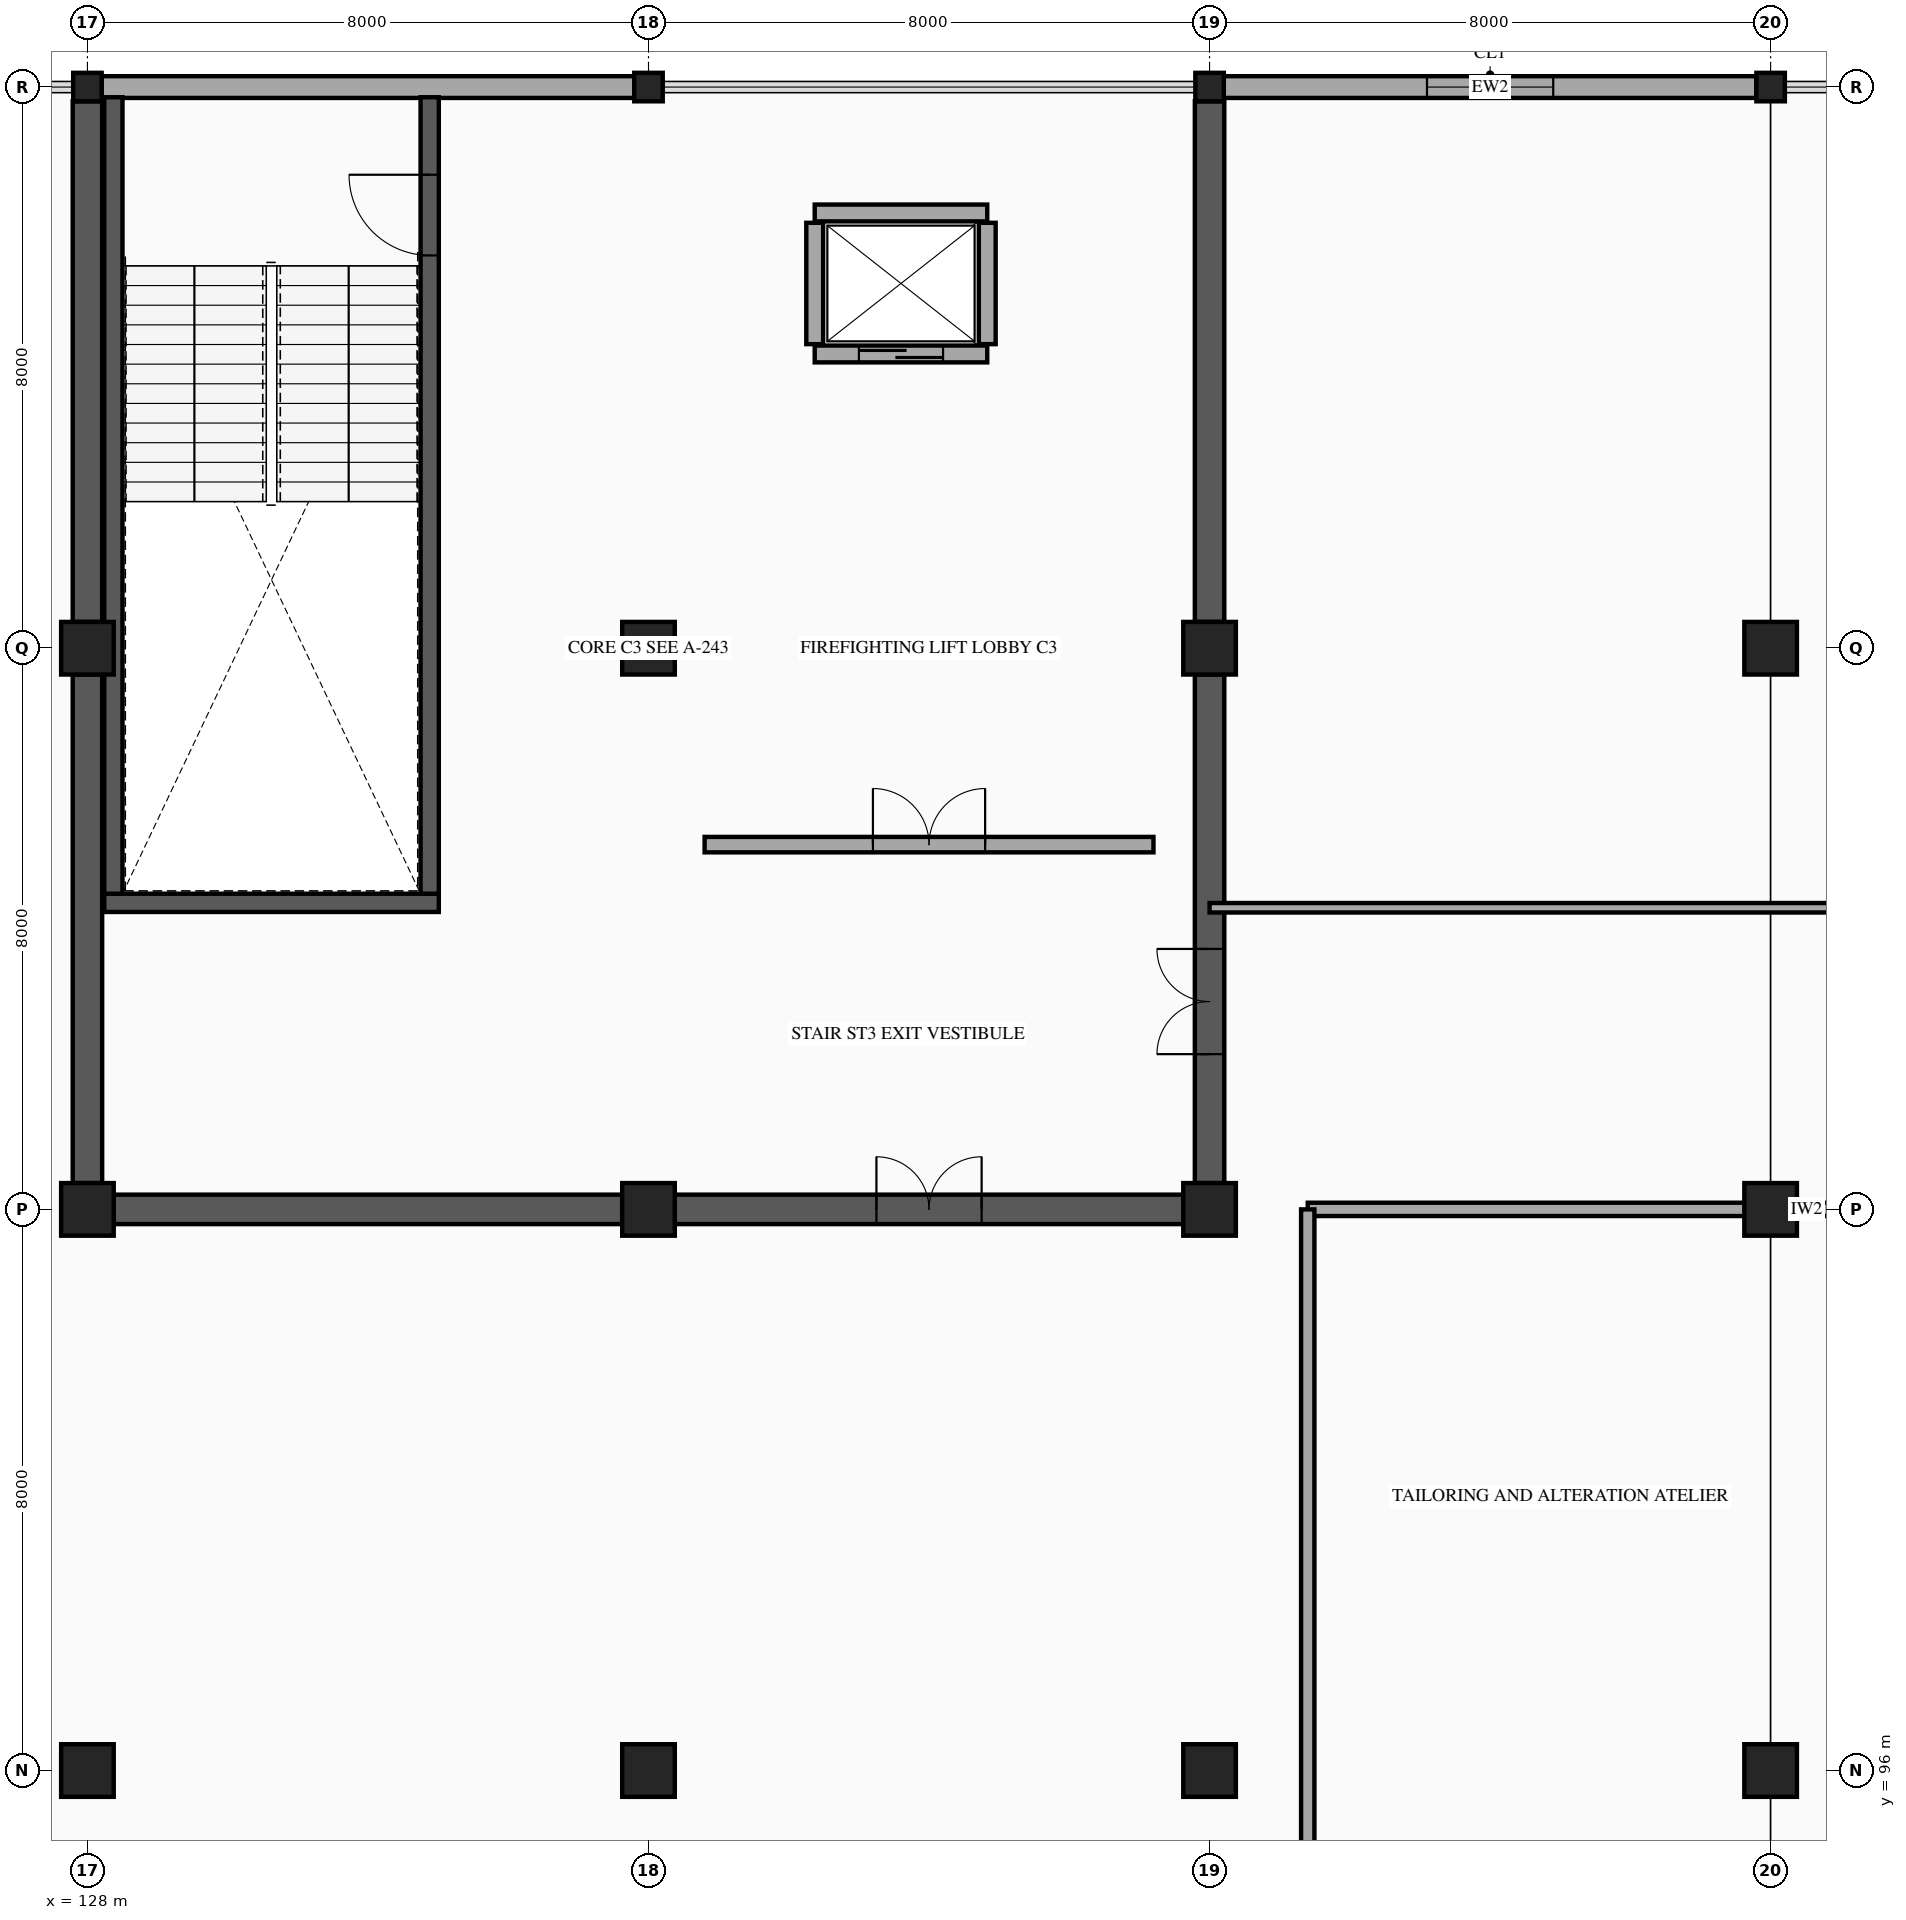
"""IFC4 building model, lengths in metres.
Left out: names, types, materials, properties, quantities, classifications, styles, units other than length and angle.
Written with IfcOpenShell. Run it as: python <this file> out.ifc"""

import sys

from ifc_helpers import new_model, si_unit, direction, frame, frame_2d, origin, origin_2d, place, context, subcontext, project, spatial, rectangle, hollow_rectangle, extrude, element, fill, save


model = new_model("IFC4")
c1 = context("Model", 3, precision=1e-05, world=origin(), true_north=direction((0.0, 1.0)))
c2 = subcontext(c1, "Body", "Model", "MODEL_VIEW")
j1 = project(units=[si_unit("LENGTHUNIT", "METRE"), si_unit("PLANEANGLEUNIT", "RADIAN")], contexts=[c1])
p1 = place(None, origin())
s1 = spatial("IfcSite", under=j1, at=p1, CompositionType="ELEMENT")
p2 = place(p1, origin())
s2 = spatial("IfcBuilding", under=s1, at=p2, CompositionType="ELEMENT")
p3 = place(p2, frame((0.0, 0.0, 10.4)))
s3 = spatial("IfcBuildingStorey", under=s2, at=p3, CompositionType="ELEMENT", Elevation=10.4)
for number, where, z_axis, x_axis in (
    (1, (128.0, 96.0, 0.0), (0.0, 0.0, 1.0), (1.0, 0.0, 0.0)),
    (2, (128.0, 104.0, 0.0), (0.0, 0.0, 1.0), (1.0, 0.0, 0.0)),
    (3, (128.0, 112.0, 0.0), (0.0, 0.0, 1.0), (1.0, 0.0, 0.0)),
):
    element("IfcColumn", number, at=place(p3, frame(where, z_axis=z_axis, x_axis=x_axis)), inside=s3, PredefinedType="COLUMN", context=c2, shape_type="SweptSolid", body=[
        extrude(rectangle(XDim=0.75, YDim=0.75, at=origin_2d()), origin(), (0.0, 0.0, 1.0), 4.5),
    ])
p4 = place(p3, frame((128.0, 120.0, 0.0), z_axis=(0.0, 0.0, 1.0), x_axis=(1.0, 0.0, 0.0)))
e4 = element("IfcColumn", 4, at=p4, inside=s3, PredefinedType="COLUMN", context=c2, shape_type="SweptSolid", body=[
    extrude(hollow_rectangle(XDim=0.406, YDim=0.406, WallThickness=0.015, InnerFilletRadius=0.015, OuterFilletRadius=0.029, at=origin_2d()), origin(), (0.0, 0.0, 1.0), 4.5),
])
for number, where, z_axis, x_axis in (
    (5, (136.0, 96.0, 0.0), (0.0, 0.0, 1.0), (1.0, 0.0, 0.0)),
    (6, (136.0, 104.0, 0.0), (0.0, 0.0, 1.0), (1.0, 0.0, 0.0)),
    (7, (136.0, 112.0, 0.0), (0.0, 0.0, 1.0), (1.0, 0.0, 0.0)),
):
    element("IfcColumn", number, at=place(p3, frame(where, z_axis=z_axis, x_axis=x_axis)), inside=s3, PredefinedType="COLUMN", context=c2, shape_type="SweptSolid", body=[
        extrude(rectangle(XDim=0.75, YDim=0.75, at=origin_2d()), origin(), (0.0, 0.0, 1.0), 4.5),
    ])
p5 = place(p3, frame((136.0, 120.0, 0.0), z_axis=(0.0, 0.0, 1.0), x_axis=(1.0, 0.0, 0.0)))
e8 = element("IfcColumn", 8, at=p5, inside=s3, PredefinedType="COLUMN", context=c2, shape_type="SweptSolid", body=[
    extrude(hollow_rectangle(XDim=0.406, YDim=0.406, WallThickness=0.015, InnerFilletRadius=0.015, OuterFilletRadius=0.029, at=origin_2d()), origin(), (0.0, 0.0, 1.0), 4.5),
])
for number, where, z_axis, x_axis in (
    (9, (144.0, 96.0, 0.0), (0.0, 0.0, 1.0), (1.0, 0.0, 0.0)),
    (10, (144.0, 104.0, 0.0), (0.0, 0.0, 1.0), (1.0, 0.0, 0.0)),
    (11, (144.0, 112.0, 0.0), (0.0, 0.0, 1.0), (1.0, 0.0, 0.0)),
):
    element("IfcColumn", number, at=place(p3, frame(where, z_axis=z_axis, x_axis=x_axis)), inside=s3, PredefinedType="COLUMN", context=c2, shape_type="SweptSolid", body=[
        extrude(rectangle(XDim=0.75, YDim=0.75, at=origin_2d()), origin(), (0.0, 0.0, 1.0), 4.5),
    ])
p6 = place(p3, frame((144.0, 120.0, 0.0), z_axis=(0.0, 0.0, 1.0), x_axis=(1.0, 0.0, 0.0)))
e12 = element("IfcColumn", 12, at=p6, inside=s3, PredefinedType="COLUMN", context=c2, shape_type="SweptSolid", body=[
    extrude(hollow_rectangle(XDim=0.406, YDim=0.406, WallThickness=0.015, InnerFilletRadius=0.015, OuterFilletRadius=0.029, at=origin_2d()), origin(), (0.0, 0.0, 1.0), 4.5),
])
for number, where, z_axis, x_axis in (
    (13, (152.0, 96.0, 0.0), (0.0, 0.0, 1.0), (1.0, 0.0, 0.0)),
    (14, (152.0, 104.0, 0.0), (0.0, 0.0, 1.0), (1.0, 0.0, 0.0)),
    (15, (152.0, 112.0, 0.0), (0.0, 0.0, 1.0), (1.0, 0.0, 0.0)),
):
    element("IfcColumn", number, at=place(p3, frame(where, z_axis=z_axis, x_axis=x_axis)), inside=s3, PredefinedType="COLUMN", context=c2, shape_type="SweptSolid", body=[
        extrude(rectangle(XDim=0.75, YDim=0.75, at=origin_2d()), origin(), (0.0, 0.0, 1.0), 4.5),
    ])
p7 = place(p3, frame((152.0, 120.0, 0.0), z_axis=(0.0, 0.0, 1.0), x_axis=(1.0, 0.0, 0.0)))
e16 = element("IfcColumn", 16, at=p7, inside=s3, PredefinedType="COLUMN", context=c2, shape_type="SweptSolid", body=[
    extrude(hollow_rectangle(XDim=0.406, YDim=0.406, WallThickness=0.015, InnerFilletRadius=0.015, OuterFilletRadius=0.029, at=origin_2d()), origin(), (0.0, 0.0, 1.0), 4.5),
])
p8 = place(p3, frame((128.203, 120.0, 0.0), z_axis=(0.0, 0.0, 1.0), x_axis=(1.0, 0.0, 0.0)))
e17 = element("IfcWall", 17, at=p8, inside=s3, PredefinedType="STANDARD", context=c2, shape_type="SweptSolid", body=[
    extrude(rectangle(XDim=7.594, YDim=0.31, at=frame_2d((3.797, 0.0))), origin(), (0.0, 0.0, 1.0), 3.48),
])
p9 = place(p3, frame((144.203, 120.0, 0.0), z_axis=(0.0, 0.0, 1.0), x_axis=(1.0, 0.0, 0.0)))
e18 = element("IfcWall", 18, at=p9, inside=s3, PredefinedType="STANDARD", context=c2, shape_type="SweptSolid", body=[
    extrude(rectangle(XDim=7.594, YDim=0.31, at=frame_2d((3.797, 0.0))), origin(), (0.0, 0.0, 1.0), 3.48),
])
p10 = place(p9, frame((2.897, 0.0, 0.8)))
e19 = element("IfcOpeningElement", 19, at=p10, cuts=e18, PredefinedType="OPENING", context=c2, shape_type="SweptSolid", body=[
    extrude(rectangle(XDim=1.8, YDim=2.4, at=frame_2d((0.9, 1.2))), frame((0.0, 0.165, 0.0), z_axis=(0.0, -1.0, 0.0), x_axis=(1.0, 0.0, 0.0)), (0.0, 0.0, 1.0), 0.33),
])
p11 = place(p3, frame((128.24, 108.37, 0.0), z_axis=(0.0, 0.0, 1.0), x_axis=(1.0, 0.0, 0.0)))
e20 = element("IfcWall", 20, at=p11, inside=s3, PredefinedType="SHEAR", context=c2, shape_type="SweptSolid", body=[
    extrude(rectangle(XDim=4.77, YDim=0.26, at=frame_2d((2.385, 0.0))), origin(), (0.0, 0.0, 1.0), 4.28),
])
p12 = place(p3, frame((128.37, 108.5, 0.0), z_axis=(0.0, 0.0, 1.0), x_axis=(0.0, 1.0, 0.0)))
e21 = element("IfcWall", 21, at=p12, inside=s3, PredefinedType="SHEAR", context=c2, shape_type="SweptSolid", body=[
    extrude(rectangle(XDim=11.355, YDim=0.26, at=frame_2d((5.677, 0.0))), origin(), (0.0, 0.0, 1.0), 4.28),
])
p13 = place(p3, frame((132.88, 108.5, 0.0), z_axis=(0.0, 0.0, 1.0), x_axis=(0.0, 1.0, 0.0)))
e22 = element("IfcWall", 22, at=p13, inside=s3, PredefinedType="SHEAR", context=c2, shape_type="SweptSolid", body=[
    extrude(rectangle(XDim=11.355, YDim=0.26, at=frame_2d((5.677, 0.0))), origin(), (0.0, 0.0, 1.0), 4.28),
])
p14 = place(p13, frame((9.1, 0.0, 0.0)))
e23 = element("IfcOpeningElement", 23, at=p14, cuts=e22, PredefinedType="OPENING", context=c2, shape_type="SweptSolid", body=[
    extrude(rectangle(XDim=1.15, YDim=2.15, at=frame_2d((0.575, 1.075))), frame((0.0, 0.14, 0.0), z_axis=(0.0, -1.0, 0.0), x_axis=(1.0, 0.0, 0.0)), (0.0, 0.0, 1.0), 0.28),
])
p15 = place(p3, frame((128.375, 104.0, 0.0), z_axis=(0.0, 0.0, 1.0), x_axis=(1.0, 0.0, 0.0)))
e24 = element("IfcWall", 24, at=p15, inside=s3, PredefinedType="SHEAR", context=c2, shape_type="SweptSolid", body=[
    extrude(rectangle(XDim=7.25, YDim=0.42, at=frame_2d((3.625, 0.0))), origin(), (0.0, 0.0, 1.0), 4.28),
])
p16 = place(p3, frame((136.375, 104.0, 0.0), z_axis=(0.0, 0.0, 1.0), x_axis=(1.0, 0.0, 0.0)))
e25 = element("IfcWall", 25, at=p16, inside=s3, PredefinedType="SHEAR", context=c2, shape_type="SweptSolid", body=[
    extrude(rectangle(XDim=7.25, YDim=0.42, at=frame_2d((3.625, 0.0))), origin(), (0.0, 0.0, 1.0), 4.28),
])
p17 = place(p16, frame((2.875, 0.0, 0.0)))
e26 = element("IfcOpeningElement", 26, at=p17, cuts=e25, PredefinedType="OPENING", context=c2, shape_type="SweptSolid", body=[
    extrude(rectangle(XDim=1.5, YDim=2.15, at=frame_2d((0.75, 1.075))), frame((0.0, 0.22, 0.0), z_axis=(0.0, -1.0, 0.0), x_axis=(1.0, 0.0, 0.0)), (0.0, 0.0, 1.0), 0.44),
])
p18 = place(p3, frame((128.0, 104.375, 0.0), z_axis=(0.0, 0.0, 1.0), x_axis=(0.0, 1.0, 0.0)))
e27 = element("IfcWall", 27, at=p18, inside=s3, PredefinedType="SHEAR", context=c2, shape_type="SweptSolid", body=[
    extrude(rectangle(XDim=7.25, YDim=0.42, at=frame_2d((3.625, 0.0))), origin(), (0.0, 0.0, 1.0), 4.28),
])
p19 = place(p3, frame((128.0, 112.375, 0.0), z_axis=(0.0, 0.0, 1.0), x_axis=(0.0, 1.0, 0.0)))
e28 = element("IfcWall", 28, at=p19, inside=s3, PredefinedType="SHEAR", context=c2, shape_type="SweptSolid", body=[
    extrude(rectangle(XDim=7.422, YDim=0.42, at=frame_2d((3.711, 0.0))), origin(), (0.0, 0.0, 1.0), 4.28),
])
p20 = place(p3, frame((144.0, 104.375, 0.0), z_axis=(0.0, 0.0, 1.0), x_axis=(0.0, 1.0, 0.0)))
e29 = element("IfcWall", 29, at=p20, inside=s3, PredefinedType="SHEAR", context=c2, shape_type="SweptSolid", body=[
    extrude(rectangle(XDim=7.25, YDim=0.42, at=frame_2d((3.625, 0.0))), origin(), (0.0, 0.0, 1.0), 4.28),
])
p21 = place(p20, frame((1.838, 0.0, 0.0)))
e30 = element("IfcOpeningElement", 30, at=p21, cuts=e29, PredefinedType="OPENING", context=c2, shape_type="SweptSolid", body=[
    extrude(rectangle(XDim=1.5, YDim=2.15, at=frame_2d((0.75, 1.075))), frame((0.0, 0.22, 0.0), z_axis=(0.0, -1.0, 0.0), x_axis=(1.0, 0.0, 0.0)), (0.0, 0.0, 1.0), 0.44),
])
p22 = place(p3, frame((144.0, 112.375, 0.0), z_axis=(0.0, 0.0, 1.0), x_axis=(0.0, 1.0, 0.0)))
e31 = element("IfcWall", 31, at=p22, inside=s3, PredefinedType="SHEAR", context=c2, shape_type="SweptSolid", body=[
    extrude(rectangle(XDim=7.422, YDim=0.42, at=frame_2d((3.711, 0.0))), origin(), (0.0, 0.0, 1.0), 4.28),
])
p23 = place(p3, frame((138.37, 116.195, 0.0), z_axis=(0.0, 0.0, 1.0), x_axis=(1.0, 0.0, 0.0)))
e32 = element("IfcWall", 32, at=p23, inside=s3, PredefinedType="PARTITIONING", context=c2, shape_type="SweptSolid", body=[
    extrude(rectangle(XDim=2.46, YDim=0.24, at=frame_2d((1.23, 0.0))), origin(), (0.0, 0.0, 1.0), 4.28),
])
p24 = place(p23, frame((0.63, 0.0, 0.0)))
e33 = element("IfcOpeningElement", 33, at=p24, cuts=e32, PredefinedType="OPENING", context=c2, shape_type="SweptSolid", body=[
    extrude(rectangle(XDim=1.2, YDim=2.15, at=frame_2d((0.6, 1.075))), frame((0.0, 0.13, 0.0), z_axis=(0.0, -1.0, 0.0), x_axis=(1.0, 0.0, 0.0)), (0.0, 0.0, 1.0), 0.26),
])
p25 = place(p3, frame((138.37, 118.205, 0.0), z_axis=(0.0, 0.0, 1.0), x_axis=(1.0, 0.0, 0.0)))
e34 = element("IfcWall", 34, at=p25, inside=s3, PredefinedType="PARTITIONING", context=c2, shape_type="SweptSolid", body=[
    extrude(rectangle(XDim=2.46, YDim=0.24, at=frame_2d((1.23, 0.0))), origin(), (0.0, 0.0, 1.0), 4.28),
])
for number, where, z_axis, x_axis in (
    (35, (138.37, 116.335, 0.0), (0.0, 0.0, 1.0), (0.0, 1.0, 0.0)),
    (36, (140.83, 116.335, 0.0), (0.0, 0.0, 1.0), (0.0, 1.0, 0.0)),
):
    element("IfcWall", number, at=place(p3, frame(where, z_axis=z_axis, x_axis=x_axis)), inside=s3, PredefinedType="PARTITIONING", context=c2, shape_type="SweptSolid", body=[
        extrude(rectangle(XDim=1.73, YDim=0.24, at=frame_2d((0.865, 0.0))), origin(), (0.0, 0.0, 1.0), 4.28),
    ])
p26 = place(p3, frame((136.8, 109.2, 0.0), z_axis=(0.0, 0.0, 1.0), x_axis=(1.0, 0.0, 0.0)))
e37 = element("IfcWall", 37, at=p26, inside=s3, PredefinedType="PARTITIONING", context=c2, shape_type="SweptSolid", body=[
    extrude(rectangle(XDim=6.4, YDim=0.22, at=frame_2d((3.2, 0.0))), origin(), (0.0, 0.0, 1.0), 3.48),
])
p27 = place(p26, frame((2.4, 0.0, 0.0)))
e38 = element("IfcOpeningElement", 38, at=p27, cuts=e37, PredefinedType="OPENING", context=c2, shape_type="SweptSolid", body=[
    extrude(rectangle(XDim=1.6, YDim=2.15, at=frame_2d((0.8, 1.075))), frame((0.0, 0.12, 0.0), z_axis=(0.0, -1.0, 0.0), x_axis=(1.0, 0.0, 0.0)), (0.0, 0.0, 1.0), 0.24),
])
p28 = place(p3, frame((145.4, 104.0, 0.0), z_axis=(0.0, 0.0, 1.0), x_axis=(1.0, 0.0, 0.0)))
e39 = element("IfcWall", 39, at=p28, inside=s3, PredefinedType="PARTITIONING", context=c2, shape_type="SweptSolid", body=[
    extrude(rectangle(XDim=14.225, YDim=0.19, at=frame_2d((7.113, 0.0))), origin(), (0.0, 0.0, 1.0), 3.48),
])
p29 = place(p28, frame((9.73, 0.0, 0.0)))
e40 = element("IfcOpeningElement", 40, at=p29, cuts=e39, PredefinedType="OPENING", context=c2, shape_type="SweptSolid", body=[
    extrude(rectangle(XDim=1.8, YDim=2.25, at=frame_2d((0.9, 1.125))), frame((0.0, 0.105, 0.0), z_axis=(0.0, -1.0, 0.0), x_axis=(1.0, 0.0, 0.0)), (0.0, 0.0, 1.0), 0.21),
])
p30 = place(p3, frame((145.4, 80.15, 0.0), z_axis=(0.0, 0.0, 1.0), x_axis=(0.0, 1.0, 0.0)))
e41 = element("IfcWall", 41, at=p30, inside=s3, PredefinedType="PARTITIONING", context=c2, shape_type="SweptSolid", body=[
    extrude(rectangle(XDim=23.85, YDim=0.19, at=frame_2d((11.925, 0.0))), origin(), (0.0, 0.0, 1.0), 3.48),
])
p31 = place(p30, frame((2.862, 0.0, 0.0)))
e42 = element("IfcOpeningElement", 42, at=p31, cuts=e41, PredefinedType="OPENING", context=c2, shape_type="SweptSolid", body=[
    extrude(rectangle(XDim=1.8, YDim=2.25, at=frame_2d((0.9, 1.125))), frame((0.0, 0.105, 0.0), z_axis=(0.0, -1.0, 0.0), x_axis=(1.0, 0.0, 0.0)), (0.0, 0.0, 1.0), 0.21),
])
p32 = place(p3, frame((144.0, 108.3, 0.0), z_axis=(0.0, 0.0, 1.0), x_axis=(1.0, 0.0, 0.0)))
e43 = element("IfcWall", 43, at=p32, inside=s3, PredefinedType="PARTITIONING", context=c2, shape_type="SweptSolid", body=[
    extrude(rectangle(XDim=31.85, YDim=0.135, at=frame_2d((15.925, 0.0))), origin(), (0.0, 0.0, 1.0), 3.48),
])
p33 = place(p32, frame((27.485, 0.0, 0.0)))
e44 = element("IfcOpeningElement", 44, at=p33, cuts=e43, PredefinedType="OPENING", context=c2, shape_type="SweptSolid", body=[
    extrude(rectangle(XDim=1.0, YDim=2.15, at=frame_2d((0.5, 1.075))), frame((0.0, 0.077, 0.0), z_axis=(0.0, -1.0, 0.0), x_axis=(1.0, 0.0, 0.0)), (0.0, 0.0, 1.0), 0.155),
])
p34 = place(p10, origin())
e45 = element("IfcWindow", 45, at=p34, inside=s3, PartitioningType="DOUBLE_PANEL_HORIZONTAL", PredefinedType="WINDOW", context=c2, shape_type="SweptSolid", body=[
    extrude(rectangle(XDim=1.8, YDim=2.4, at=frame_2d((0.9, 1.2))), frame((0.0, 0.03, 0.0), z_axis=(0.0, -1.0, 0.0), x_axis=(1.0, 0.0, 0.0)), (0.0, 0.0, 1.0), 0.06),
])
fill(e19, e45)
p35 = place(p14, origin())
e46 = element("IfcDoor", 46, at=p35, inside=s3, OperationType="SINGLE_SWING_RIGHT", PredefinedType="DOOR", context=c2, shape_type="SweptSolid", body=[
    extrude(rectangle(XDim=1.15, YDim=2.15, at=frame_2d((0.575, 1.075))), frame((0.0, 0.025, 0.0), z_axis=(0.0, -1.0, 0.0), x_axis=(1.0, 0.0, 0.0)), (0.0, 0.0, 1.0), 0.05),
])
fill(e23, e46)
p36 = place(p17, origin())
e47 = element("IfcDoor", 47, at=p36, inside=s3, OperationType="DOUBLE_DOOR_SINGLE_SWING", PredefinedType="DOOR", context=c2, shape_type="SweptSolid", body=[
    extrude(rectangle(XDim=1.5, YDim=2.15, at=frame_2d((0.75, 1.075))), frame((0.0, 0.025, 0.0), z_axis=(0.0, -1.0, 0.0), x_axis=(1.0, 0.0, 0.0)), (0.0, 0.0, 1.0), 0.05),
])
fill(e26, e47)
p37 = place(p21, origin())
e48 = element("IfcDoor", 48, at=p37, inside=s3, OperationType="DOUBLE_DOOR_SINGLE_SWING", PredefinedType="DOOR", context=c2, shape_type="SweptSolid", body=[
    extrude(rectangle(XDim=1.5, YDim=2.15, at=frame_2d((0.75, 1.075))), frame((0.0, 0.025, 0.0), z_axis=(0.0, -1.0, 0.0), x_axis=(1.0, 0.0, 0.0)), (0.0, 0.0, 1.0), 0.05),
])
fill(e30, e48)
p38 = place(p24, origin())
e49 = element("IfcDoor", 49, at=p38, inside=s3, OperationType="SLIDING_TO_LEFT", PredefinedType="DOOR", context=c2, shape_type="SweptSolid", body=[
    extrude(rectangle(XDim=1.2, YDim=2.15, at=frame_2d((0.6, 1.075))), frame((0.0, 0.025, 0.0), z_axis=(0.0, -1.0, 0.0), x_axis=(1.0, 0.0, 0.0)), (0.0, 0.0, 1.0), 0.05),
])
fill(e33, e49)
p39 = place(p27, origin())
e50 = element("IfcDoor", 50, at=p39, inside=s3, OperationType="DOUBLE_DOOR_SINGLE_SWING", PredefinedType="DOOR", context=c2, shape_type="SweptSolid", body=[
    extrude(rectangle(XDim=1.6, YDim=2.15, at=frame_2d((0.8, 1.075))), frame((0.0, 0.025, 0.0), z_axis=(0.0, -1.0, 0.0), x_axis=(1.0, 0.0, 0.0)), (0.0, 0.0, 1.0), 0.05),
])
fill(e38, e50)
save(model, sys.argv[1])
